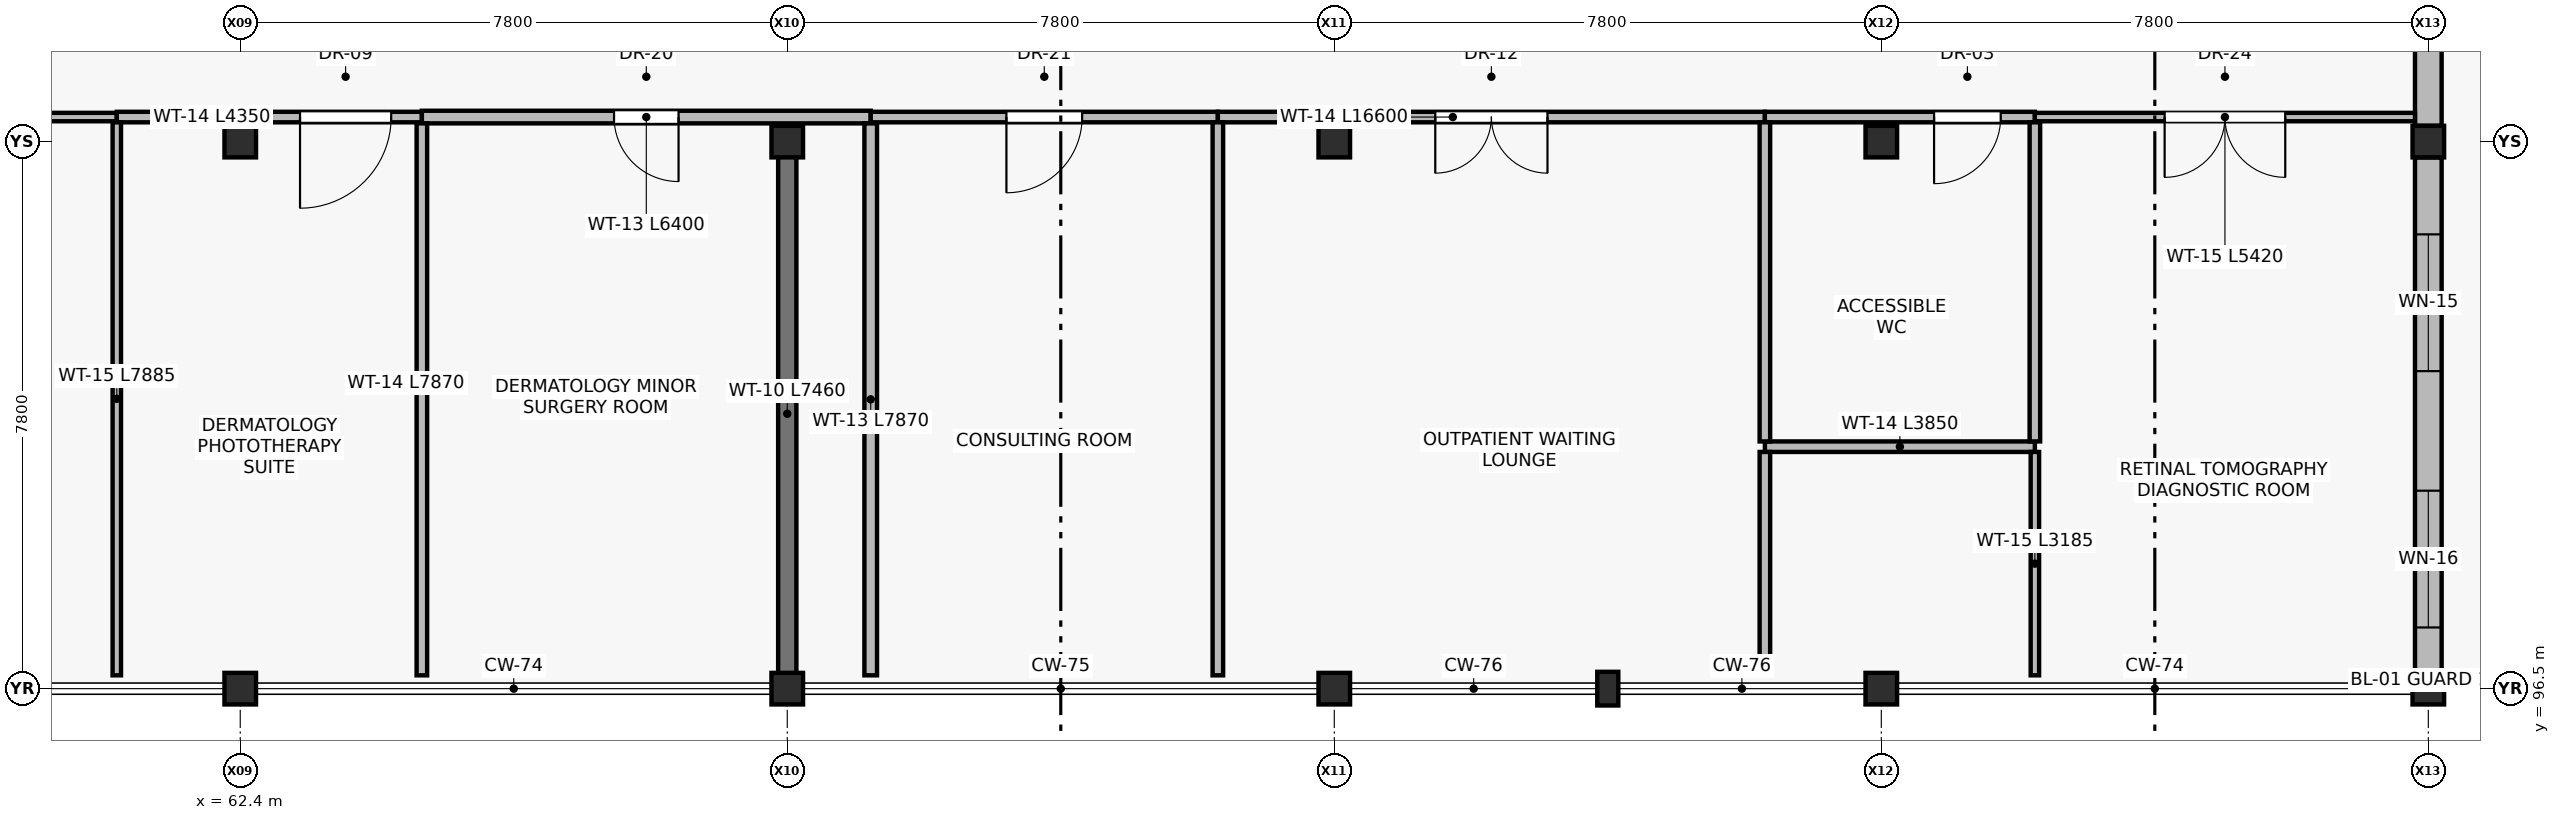
"""IFC4 building model, lengths in metres.
Left out: names, types, materials, properties, quantities, classifications, styles, units other than length and angle.
Written with IfcOpenShell. Run it as: python <this file> out.ifc"""

import sys

from ifc_helpers import new_model, si_unit, direction, frame, frame_2d, origin, origin_2d, place, context, subcontext, project, spatial, rectangle, extrude, element, fill, save


model = new_model("IFC4")
c1 = context("Model", 3, precision=1e-05, world=origin(), true_north=direction((0.0, 1.0)))
c2 = subcontext(c1, "Body", "Model", "MODEL_VIEW")
j1 = project(units=[si_unit("LENGTHUNIT", "METRE"), si_unit("PLANEANGLEUNIT", "RADIAN")], contexts=[c1])
p1 = place(None, origin())
s1 = spatial("IfcSite", under=j1, at=p1, CompositionType="ELEMENT")
p2 = place(p1, origin())
s2 = spatial("IfcBuilding", under=s1, at=p2, CompositionType="ELEMENT")
p3 = place(p2, frame((0.0, 0.0, 18.6)))
s3 = spatial("IfcBuildingStorey", under=s2, at=p3, CompositionType="ELEMENT", Elevation=18.6)
for number, where, z_axis, x_axis in (
    (1, (62.4, 96.5, 0.0), (0.0, 0.0, 1.0), (1.0, 0.0, 0.0)),
    (2, (62.4, 104.3, 0.0), (0.0, 0.0, 1.0), (1.0, 0.0, 0.0)),
    (3, (70.2, 96.5, 0.0), (0.0, 0.0, 1.0), (1.0, 0.0, 0.0)),
    (4, (70.2, 104.3, 0.0), (0.0, 0.0, 1.0), (1.0, 0.0, 0.0)),
    (5, (78.0, 96.5, 0.0), (0.0, 0.0, 1.0), (1.0, 0.0, 0.0)),
    (6, (78.0, 104.3, 0.0), (0.0, 0.0, 1.0), (1.0, 0.0, 0.0)),
    (7, (85.8, 96.5, 0.0), (0.0, 0.0, 1.0), (1.0, 0.0, 0.0)),
    (8, (85.8, 104.3, 0.0), (0.0, 0.0, 1.0), (1.0, 0.0, 0.0)),
    (9, (93.6, 96.5, 0.0), (0.0, 0.0, 1.0), (1.0, 0.0, 0.0)),
    (10, (93.6, 104.3, 0.0), (0.0, 0.0, 1.0), (1.0, 0.0, 0.0)),
):
    element("IfcColumn", number, at=place(p3, frame(where, z_axis=z_axis, x_axis=x_axis)), inside=s3, PredefinedType="COLUMN", context=c2, shape_type="SweptSolid", body=[
        extrude(rectangle(XDim=0.45, YDim=0.45, at=origin_2d()), origin(), (0.0, 0.0, 1.0), 4.5),
    ])
p4 = place(p3, frame((81.9, 96.5, 0.0), z_axis=(0.0, 0.0, 1.0), x_axis=(1.0, 0.0, 0.0)))
e11 = element("IfcColumn", 11, at=p4, inside=s3, PredefinedType="PILASTER", context=c2, shape_type="SweptSolid", body=[
    extrude(rectangle(XDim=0.3, YDim=0.48, at=origin_2d()), origin(), (0.0, 0.0, 1.0), 4.5),
])
p5 = place(p3, frame((93.6, 104.075, 0.0), z_axis=(0.0, 0.0, 1.0), x_axis=(0.0, -1.0, 0.0)))
e12 = element("IfcWall", 12, at=p5, inside=s3, PredefinedType="STANDARD", context=c2, shape_type="SweptSolid", body=[
    extrude(rectangle(XDim=7.35, YDim=0.38, at=frame_2d((3.675, 0.0))), origin(), (0.0, 0.0, 1.0), 3.82),
])
p6 = place(p5, frame((1.097, 0.0, 0.9)))
e13 = element("IfcOpeningElement", 13, at=p6, cuts=e12, PredefinedType="OPENING", context=c2, shape_type="SweptSolid", body=[
    extrude(rectangle(XDim=1.95, YDim=1.65, at=frame_2d((0.975, 0.825))), frame((0.0, 0.2, 0.0), z_axis=(0.0, -1.0, 0.0), x_axis=(1.0, 0.0, 0.0)), (0.0, 0.0, 1.0), 0.4),
])
p7 = place(p5, frame((4.752, 0.0, 0.9)))
e14 = element("IfcOpeningElement", 14, at=p7, cuts=e12, PredefinedType="OPENING", context=c2, shape_type="SweptSolid", body=[
    extrude(rectangle(XDim=1.95, YDim=2.15, at=frame_2d((0.975, 1.075))), frame((0.0, 0.2, 0.0), z_axis=(0.0, -1.0, 0.0), x_axis=(1.0, 0.0, 0.0)), (0.0, 0.0, 1.0), 0.4),
])
p8 = place(p3, frame((93.6, 107.975, 0.0), z_axis=(0.0, 0.0, 1.0), x_axis=(0.0, -1.0, 0.0)))
e15 = element("IfcWall", 15, at=p8, inside=s3, PredefinedType="STANDARD", context=c2, shape_type="SweptSolid", body=[
    extrude(rectangle(XDim=3.45, YDim=0.38, at=frame_2d((1.725, 0.0))), origin(), (0.0, 0.0, 1.0), 3.82),
])
p9 = place(p8, frame((1.1, 0.0, 0.0)))
e16 = element("IfcOpeningElement", 16, at=p9, cuts=e15, PredefinedType="OPENING", context=c2, shape_type="SweptSolid", body=[
    extrude(rectangle(XDim=1.25, YDim=2.2, at=frame_2d((0.625, 1.1))), frame((0.0, 0.2, 0.0), z_axis=(0.0, -1.0, 0.0), x_axis=(1.0, 0.0, 0.0)), (0.0, 0.0, 1.0), 0.4),
])
p10 = place(p3, frame((70.2, 96.69, 0.0), z_axis=(0.0, 0.0, 1.0), x_axis=(0.0, 1.0, 0.0)))
e17 = element("IfcWall", 17, at=p10, inside=s3, PredefinedType="SHEAR", context=c2, shape_type="SweptSolid", body=[
    extrude(rectangle(XDim=7.46, YDim=0.26, at=frame_2d((3.73, 0.0))), origin(), (0.0, 0.0, 1.0), 4.26),
])
p11 = place(p3, frame((60.64, 104.65, 0.0), z_axis=(0.0, 0.0, 1.0), x_axis=(-1.0, 0.0, 0.0)))
e18 = element("IfcWall", 18, at=p11, inside=s3, PredefinedType="PARTITIONING", context=c2, shape_type="SweptSolid", body=[
    extrude(rectangle(XDim=5.85, YDim=0.12, at=frame_2d((2.925, 0.0))), origin(), (0.0, 0.0, 1.0), 3.72),
])
p12 = place(p11, frame((2.325, 0.0, 0.0)))
e19 = element("IfcOpeningElement", 19, at=p12, cuts=e18, PredefinedType="OPENING", context=c2, shape_type="SweptSolid", body=[
    extrude(rectangle(XDim=1.2, YDim=2.2, at=frame_2d((0.6, 1.1))), frame((0.0, 0.07, 0.0), z_axis=(0.0, -1.0, 0.0), x_axis=(1.0, 0.0, 0.0)), (0.0, 0.0, 1.0), 0.14),
])
p13 = place(p3, frame((64.99, 104.65, 0.0), z_axis=(0.0, 0.0, 1.0), x_axis=(-1.0, 0.0, 0.0)))
e20 = element("IfcWall", 20, at=p13, inside=s3, PredefinedType="PARTITIONING", context=c2, shape_type="SweptSolid", body=[
    extrude(rectangle(XDim=4.35, YDim=0.15, at=frame_2d((2.175, 0.0))), origin(), (0.0, 0.0, 1.0), 3.72),
])
p14 = place(p13, frame((0.438, 0.0, 0.0)))
e21 = element("IfcOpeningElement", 21, at=p14, cuts=e20, PredefinedType="OPENING", context=c2, shape_type="SweptSolid", body=[
    extrude(rectangle(XDim=1.3, YDim=2.2, at=frame_2d((0.65, 1.1))), frame((0.0, 0.085, 0.0), z_axis=(0.0, -1.0, 0.0), x_axis=(1.0, 0.0, 0.0)), (0.0, 0.0, 1.0), 0.17),
])
p15 = place(p3, frame((71.39, 104.65, 0.0), z_axis=(0.0, 0.0, 1.0), x_axis=(-1.0, 0.0, 0.0)))
e22 = element("IfcWall", 22, at=p15, inside=s3, PredefinedType="PARTITIONING", context=c2, shape_type="SweptSolid", body=[
    extrude(rectangle(XDim=6.4, YDim=0.18, at=frame_2d((3.2, 0.0))), origin(), (0.0, 0.0, 1.0), 3.72),
])
p16 = place(p15, frame((2.74, 0.0, 0.0)))
e23 = element("IfcOpeningElement", 23, at=p16, cuts=e22, PredefinedType="OPENING", context=c2, shape_type="SweptSolid", body=[
    extrude(rectangle(XDim=0.92, YDim=2.15, at=frame_2d((0.46, 1.075))), frame((0.0, 0.1, 0.0), z_axis=(0.0, -1.0, 0.0), x_axis=(1.0, 0.0, 0.0)), (0.0, 0.0, 1.0), 0.2),
])
p17 = place(p3, frame((76.34, 104.65, 0.0), z_axis=(0.0, 0.0, 1.0), x_axis=(-1.0, 0.0, 0.0)))
e24 = element("IfcWall", 24, at=p17, inside=s3, PredefinedType="PARTITIONING", context=c2, shape_type="SweptSolid", body=[
    extrude(rectangle(XDim=4.95, YDim=0.15, at=frame_2d((2.475, 0.0))), origin(), (0.0, 0.0, 1.0), 3.72),
])
p18 = place(p17, frame((1.935, 0.0, 0.0)))
e25 = element("IfcOpeningElement", 25, at=p18, cuts=e24, PredefinedType="OPENING", context=c2, shape_type="SweptSolid", body=[
    extrude(rectangle(XDim=1.08, YDim=2.2, at=frame_2d((0.54, 1.1))), frame((0.0, 0.085, 0.0), z_axis=(0.0, -1.0, 0.0), x_axis=(1.0, 0.0, 0.0)), (0.0, 0.0, 1.0), 0.17),
])
p19 = place(p3, frame((84.14, 104.65, 0.0), z_axis=(0.0, 0.0, 1.0), x_axis=(-1.0, 0.0, 0.0)))
e26 = element("IfcWall", 26, at=p19, inside=s3, PredefinedType="PARTITIONING", context=c2, shape_type="SweptSolid", body=[
    extrude(rectangle(XDim=7.8, YDim=0.15, at=frame_2d((3.9, 0.0))), origin(), (0.0, 0.0, 1.0), 3.72),
])
p20 = place(p19, frame((3.1, 0.0, 0.0)))
e27 = element("IfcOpeningElement", 27, at=p20, cuts=e26, PredefinedType="OPENING", context=c2, shape_type="SweptSolid", body=[
    extrude(rectangle(XDim=1.6, YDim=2.2, at=frame_2d((0.8, 1.1))), frame((0.0, 0.085, 0.0), z_axis=(0.0, -1.0, 0.0), x_axis=(1.0, 0.0, 0.0)), (0.0, 0.0, 1.0), 0.17),
])
p21 = place(p3, frame((87.99, 104.65, 0.0), z_axis=(0.0, 0.0, 1.0), x_axis=(-1.0, 0.0, 0.0)))
e28 = element("IfcWall", 28, at=p21, inside=s3, PredefinedType="PARTITIONING", context=c2, shape_type="SweptSolid", body=[
    extrude(rectangle(XDim=3.85, YDim=0.15, at=frame_2d((1.925, 0.0))), origin(), (0.0, 0.0, 1.0), 3.72),
])
p22 = place(p21, frame((0.488, 0.0, 0.0)))
e29 = element("IfcOpeningElement", 29, at=p22, cuts=e28, PredefinedType="OPENING", context=c2, shape_type="SweptSolid", body=[
    extrude(rectangle(XDim=0.95, YDim=2.1, at=frame_2d((0.475, 1.05))), frame((0.0, 0.085, 0.0), z_axis=(0.0, -1.0, 0.0), x_axis=(1.0, 0.0, 0.0)), (0.0, 0.0, 1.0), 0.17),
])
p23 = place(p3, frame((84.14, 99.95, 0.0), z_axis=(0.0, 0.0, 1.0), x_axis=(1.0, 0.0, 0.0)))
e30 = element("IfcWall", 30, at=p23, inside=s3, PredefinedType="PARTITIONING", context=c2, shape_type="SweptSolid", body=[
    extrude(rectangle(XDim=3.85, YDim=0.15, at=frame_2d((1.925, 0.0))), origin(), (0.0, 0.0, 1.0), 4.26),
])
p24 = place(p3, frame((93.41, 104.65, 0.0), z_axis=(0.0, 0.0, 1.0), x_axis=(-1.0, 0.0, 0.0)))
e31 = element("IfcWall", 31, at=p24, inside=s3, PredefinedType="PARTITIONING", context=c2, shape_type="SweptSolid", body=[
    extrude(rectangle(XDim=5.42, YDim=0.12, at=frame_2d((2.71, 0.0))), origin(), (0.0, 0.0, 1.0), 3.72),
])
p25 = place(p24, frame((1.85, 0.0, 0.0)))
e32 = element("IfcOpeningElement", 32, at=p25, cuts=e31, PredefinedType="OPENING", context=c2, shape_type="SweptSolid", body=[
    extrude(rectangle(XDim=1.72, YDim=2.3, at=frame_2d((0.86, 1.15))), frame((0.0, 0.07, 0.0), z_axis=(0.0, -1.0, 0.0), x_axis=(1.0, 0.0, 0.0)), (0.0, 0.0, 1.0), 0.14),
])
p26 = place(p3, frame((60.64, 96.69, 0.0), z_axis=(0.0, 0.0, 1.0), x_axis=(0.0, 1.0, 0.0)))
e33 = element("IfcWall", 33, at=p26, inside=s3, PredefinedType="PARTITIONING", context=c2, shape_type="SweptSolid", body=[
    extrude(rectangle(XDim=7.885, YDim=0.12, at=frame_2d((3.942, 0.0))), origin(), (0.0, 0.0, 1.0), 4.26),
])
p27 = place(p3, frame((64.99, 96.69, 0.0), z_axis=(0.0, 0.0, 1.0), x_axis=(0.0, 1.0, 0.0)))
e34 = element("IfcWall", 34, at=p27, inside=s3, PredefinedType="PARTITIONING", context=c2, shape_type="SweptSolid", body=[
    extrude(rectangle(XDim=7.87, YDim=0.15, at=frame_2d((3.935, 0.0))), origin(), (0.0, 0.0, 1.0), 3.98),
])
p28 = place(p3, frame((71.39, 96.69, 0.0), z_axis=(0.0, 0.0, 1.0), x_axis=(0.0, 1.0, 0.0)))
e35 = element("IfcWall", 35, at=p28, inside=s3, PredefinedType="PARTITIONING", context=c2, shape_type="SweptSolid", body=[
    extrude(rectangle(XDim=7.87, YDim=0.18, at=frame_2d((3.935, 0.0))), origin(), (0.0, 0.0, 1.0), 4.26),
])
p29 = place(p3, frame((76.34, 96.69, 0.0), z_axis=(0.0, 0.0, 1.0), x_axis=(0.0, 1.0, 0.0)))
e36 = element("IfcWall", 36, at=p29, inside=s3, PredefinedType="PARTITIONING", context=c2, shape_type="SweptSolid", body=[
    extrude(rectangle(XDim=7.885, YDim=0.15, at=frame_2d((3.942, 0.0))), origin(), (0.0, 0.0, 1.0), 4.26),
])
p30 = place(p3, frame((84.14, 96.69, 0.0), z_axis=(0.0, 0.0, 1.0), x_axis=(0.0, 1.0, 0.0)))
e37 = element("IfcWall", 37, at=p30, inside=s3, PredefinedType="PARTITIONING", context=c2, shape_type="SweptSolid", body=[
    extrude(rectangle(XDim=3.185, YDim=0.15, at=frame_2d((1.593, 0.0))), origin(), (0.0, 0.0, 1.0), 4.26),
])
p31 = place(p3, frame((84.14, 100.025, 0.0), z_axis=(0.0, 0.0, 1.0), x_axis=(0.0, 1.0, 0.0)))
e38 = element("IfcWall", 38, at=p31, inside=s3, PredefinedType="PARTITIONING", context=c2, shape_type="SweptSolid", body=[
    extrude(rectangle(XDim=4.55, YDim=0.15, at=frame_2d((2.275, 0.0))), origin(), (0.0, 0.0, 1.0), 4.26),
])
p32 = place(p3, frame((87.99, 100.025, 0.0), z_axis=(0.0, 0.0, 1.0), x_axis=(0.0, 1.0, 0.0)))
e39 = element("IfcWall", 39, at=p32, inside=s3, PredefinedType="PARTITIONING", context=c2, shape_type="SweptSolid", body=[
    extrude(rectangle(XDim=4.55, YDim=0.15, at=frame_2d((2.275, 0.0))), origin(), (0.0, 0.0, 1.0), 3.98),
])
p33 = place(p3, frame((87.99, 96.69, 0.0), z_axis=(0.0, 0.0, 1.0), x_axis=(0.0, 1.0, 0.0)))
e40 = element("IfcWall", 40, at=p33, inside=s3, PredefinedType="PARTITIONING", context=c2, shape_type="SweptSolid", body=[
    extrude(rectangle(XDim=3.185, YDim=0.12, at=frame_2d((1.593, 0.0))), origin(), (0.0, 0.0, 1.0), 3.98),
])
p34 = place(p6, origin())
e41 = element("IfcWindow", 41, at=p34, inside=s3, PartitioningType="SINGLE_PANEL", PredefinedType="WINDOW", context=c2, shape_type="SweptSolid", body=[
    extrude(rectangle(XDim=1.95, YDim=1.65, at=frame_2d((0.975, 0.825))), frame((0.0, 0.03, 0.0), z_axis=(0.0, -1.0, 0.0), x_axis=(1.0, 0.0, 0.0)), (0.0, 0.0, 1.0), 0.06),
])
fill(e13, e41)
p35 = place(p7, origin())
e42 = element("IfcWindow", 42, at=p35, inside=s3, PartitioningType="SINGLE_PANEL", PredefinedType="WINDOW", context=c2, shape_type="SweptSolid", body=[
    extrude(rectangle(XDim=1.95, YDim=2.15, at=frame_2d((0.975, 1.075))), frame((0.0, 0.03, 0.0), z_axis=(0.0, -1.0, 0.0), x_axis=(1.0, 0.0, 0.0)), (0.0, 0.0, 1.0), 0.06),
])
fill(e14, e42)
p36 = place(p14, origin())
e43 = element("IfcDoor", 43, at=p36, inside=s3, OperationType="SINGLE_SWING_RIGHT", PredefinedType="DOOR", context=c2, shape_type="SweptSolid", body=[
    extrude(rectangle(XDim=1.3, YDim=2.2, at=frame_2d((0.65, 1.1))), frame((0.0, 0.025, 0.0), z_axis=(0.0, -1.0, 0.0), x_axis=(1.0, 0.0, 0.0)), (0.0, 0.0, 1.0), 0.05),
])
fill(e21, e43)
p37 = place(p16, origin())
e44 = element("IfcDoor", 44, at=p37, inside=s3, OperationType="SINGLE_SWING_LEFT", PredefinedType="DOOR", context=c2, shape_type="SweptSolid", body=[
    extrude(rectangle(XDim=0.92, YDim=2.15, at=frame_2d((0.46, 1.075))), frame((0.0, 0.025, 0.0), z_axis=(0.0, -1.0, 0.0), x_axis=(1.0, 0.0, 0.0)), (0.0, 0.0, 1.0), 0.05),
])
fill(e23, e44)
p38 = place(p18, origin())
e45 = element("IfcDoor", 45, at=p38, inside=s3, OperationType="SINGLE_SWING_RIGHT", PredefinedType="DOOR", context=c2, shape_type="SweptSolid", body=[
    extrude(rectangle(XDim=1.08, YDim=2.2, at=frame_2d((0.54, 1.1))), frame((0.0, 0.025, 0.0), z_axis=(0.0, -1.0, 0.0), x_axis=(1.0, 0.0, 0.0)), (0.0, 0.0, 1.0), 0.05),
])
fill(e25, e45)
p39 = place(p20, origin())
e46 = element("IfcDoor", 46, at=p39, inside=s3, OperationType="DOUBLE_DOOR_SINGLE_SWING", PredefinedType="DOOR", context=c2, shape_type="SweptSolid", body=[
    extrude(rectangle(XDim=1.6, YDim=2.2, at=frame_2d((0.8, 1.1))), frame((0.0, 0.025, 0.0), z_axis=(0.0, -1.0, 0.0), x_axis=(1.0, 0.0, 0.0)), (0.0, 0.0, 1.0), 0.05),
])
fill(e27, e46)
p40 = place(p22, origin())
e47 = element("IfcDoor", 47, at=p40, inside=s3, OperationType="SINGLE_SWING_RIGHT", PredefinedType="DOOR", context=c2, shape_type="SweptSolid", body=[
    extrude(rectangle(XDim=0.95, YDim=2.1, at=frame_2d((0.475, 1.05))), frame((0.0, 0.025, 0.0), z_axis=(0.0, -1.0, 0.0), x_axis=(1.0, 0.0, 0.0)), (0.0, 0.0, 1.0), 0.05),
])
fill(e29, e47)
p41 = place(p25, origin())
e48 = element("IfcDoor", 48, at=p41, inside=s3, OperationType="DOUBLE_DOOR_SINGLE_SWING", PredefinedType="DOOR", context=c2, shape_type="SweptSolid", body=[
    extrude(rectangle(XDim=1.72, YDim=2.3, at=frame_2d((0.86, 1.15))), frame((0.0, 0.025, 0.0), z_axis=(0.0, -1.0, 0.0), x_axis=(1.0, 0.0, 0.0)), (0.0, 0.0, 1.0), 0.05),
])
fill(e32, e48)
save(model, sys.argv[1])
